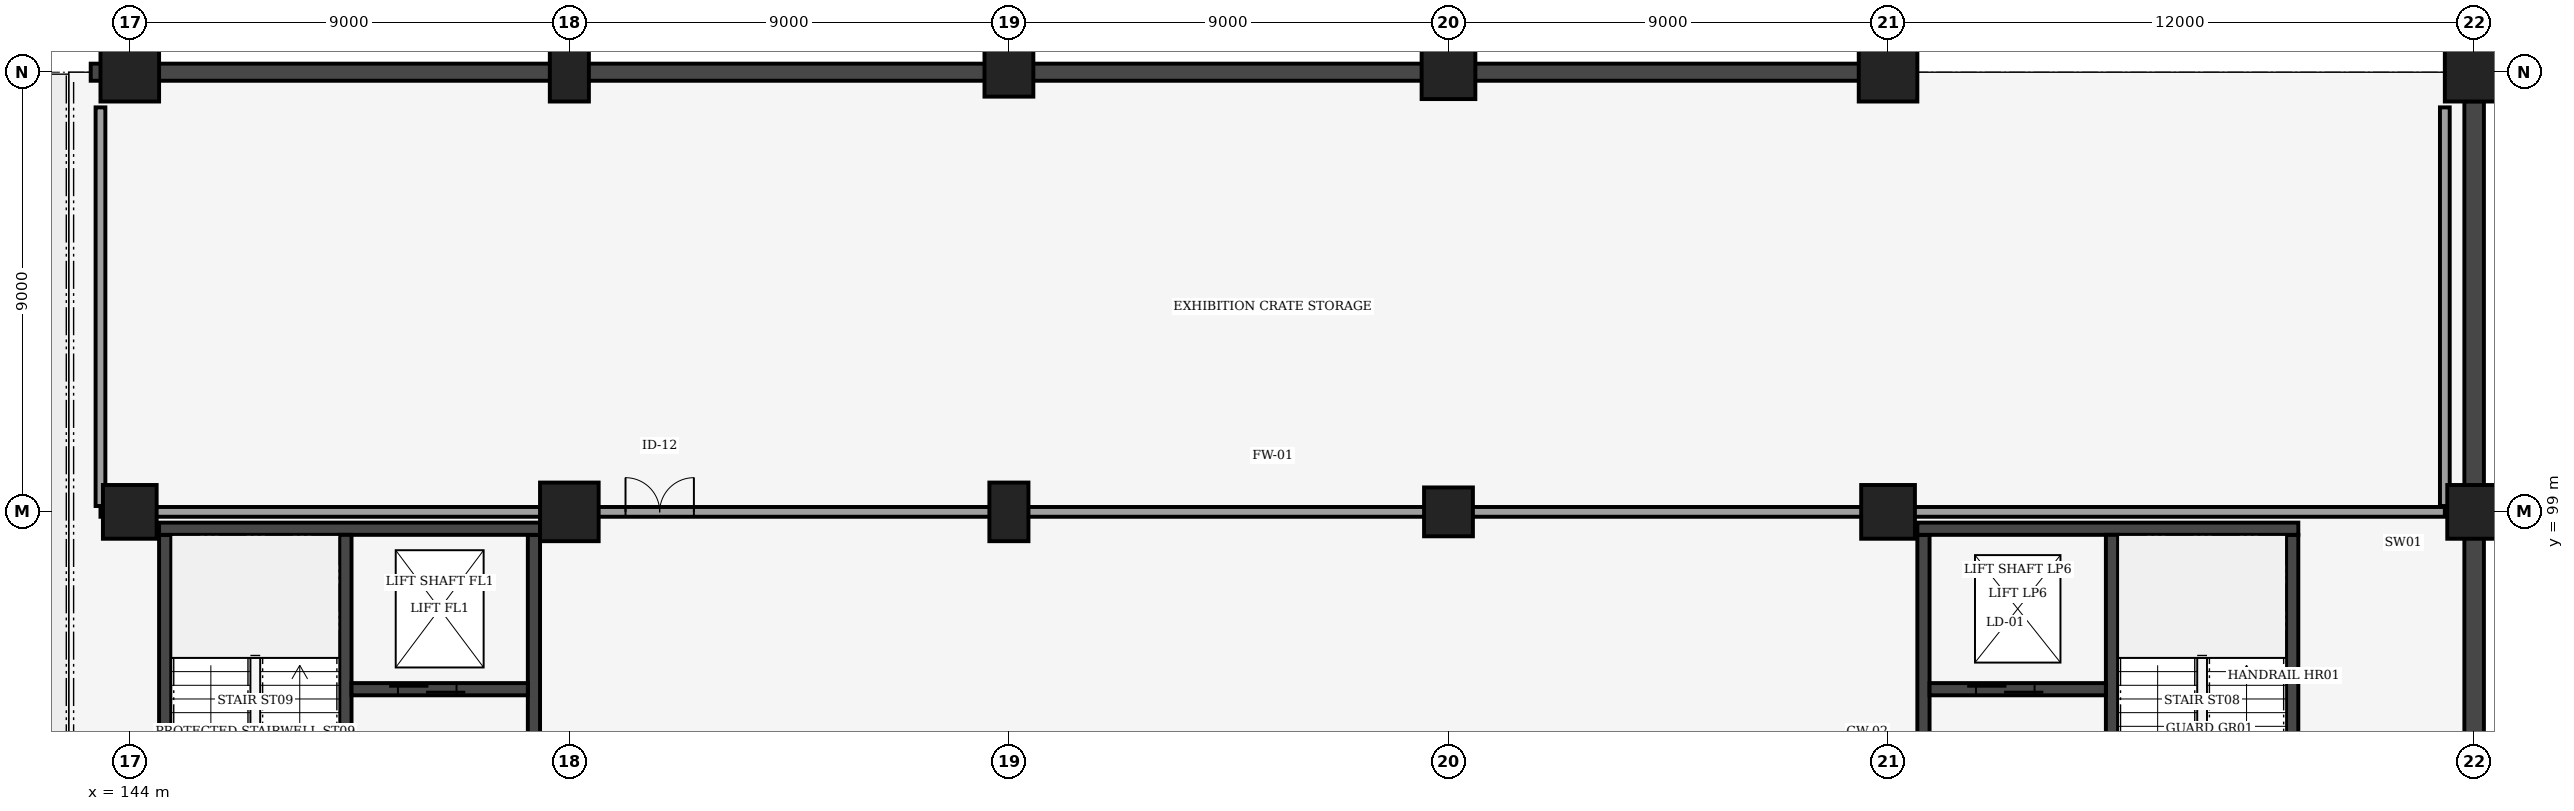
"""IFC4 building model, lengths in metres.
Left out: names, types, materials, properties, quantities, classifications, styles, units other than length and angle.
Written with IfcOpenShell. Run it as: python <this file> out.ifc"""

import sys

from ifc_helpers import new_model, si_unit, direction, frame, frame_2d, origin, origin_2d, place, context, subcontext, project, spatial, rectangle, extrude, element, fill, save


model = new_model("IFC4")
c1 = context("Model", 3, precision=1e-05, world=origin(), true_north=direction((0.0, 1.0)))
c2 = subcontext(c1, "Body", "Model", "MODEL_VIEW")
j1 = project(units=[si_unit("LENGTHUNIT", "METRE"), si_unit("PLANEANGLEUNIT", "RADIAN")], contexts=[c1])
p1 = place(None, origin())
s1 = spatial("IfcSite", under=j1, at=p1, CompositionType="ELEMENT")
p2 = place(p1, origin())
s2 = spatial("IfcBuilding", under=s1, at=p2, CompositionType="ELEMENT")
p3 = place(p2, frame((0.0, 0.0, -5.0)))
s3 = spatial("IfcBuildingStorey", under=s2, at=p3, CompositionType="ELEMENT", Elevation=-5.0)
p4 = place(p3, frame((144.0, 99.0, 0.0), z_axis=(0.0, 0.0, 1.0), x_axis=(1.0, 0.0, 0.0)))
e1 = element("IfcColumn", 1, at=p4, inside=s3, PredefinedType="COLUMN", context=c2, shape_type="SweptSolid", body=[
    extrude(rectangle(XDim=1.1, YDim=1.1, at=origin_2d()), origin(), (0.0, 0.0, 1.0), 5.0),
])
for number, where, z_axis, x_axis in (
    (2, (144.0, 108.0, 0.0), (0.0, 0.0, 1.0), (1.0, 0.0, 0.0)),
    (3, (153.0, 99.0, 0.0), (0.0, 0.0, 1.0), (1.0, 0.0, 0.0)),
):
    element("IfcColumn", number, at=place(p3, frame(where, z_axis=z_axis, x_axis=x_axis)), inside=s3, PredefinedType="COLUMN", context=c2, shape_type="SweptSolid", body=[
        extrude(rectangle(XDim=1.2, YDim=1.2, at=origin_2d()), origin(), (0.0, 0.0, 1.0), 5.0),
    ])
for number, where, z_axis, x_axis in (
    (4, (153.0, 108.0, 0.0), (0.0, 0.0, 1.0), (1.0, 0.0, 0.0)),
    (5, (162.0, 99.0, 0.0), (0.0, 0.0, 1.0), (1.0, 0.0, 0.0)),
):
    element("IfcColumn", number, at=place(p3, frame(where, z_axis=z_axis, x_axis=x_axis)), inside=s3, PredefinedType="COLUMN", context=c2, shape_type="SweptSolid", body=[
        extrude(rectangle(XDim=0.8, YDim=1.2, at=origin_2d()), origin(), (0.0, 0.0, 1.0), 5.0),
    ])
for number, where, z_axis, x_axis in (
    (6, (162.0, 108.0, 0.0), (0.0, 0.0, 1.0), (1.0, 0.0, 0.0)),
    (7, (171.0, 99.0, 0.0), (0.0, 0.0, 1.0), (1.0, 0.0, 0.0)),
):
    element("IfcColumn", number, at=place(p3, frame(where, z_axis=z_axis, x_axis=x_axis)), inside=s3, PredefinedType="COLUMN", context=c2, shape_type="SweptSolid", body=[
        extrude(rectangle(XDim=1.0, YDim=1.0, at=origin_2d()), origin(), (0.0, 0.0, 1.0), 5.0),
    ])
for number, where, z_axis, x_axis in (
    (8, (171.0, 108.0, 0.0), (0.0, 0.0, 1.0), (1.0, 0.0, 0.0)),
    (9, (180.0, 99.0, 0.0), (0.0, 0.0, 1.0), (1.0, 0.0, 0.0)),
):
    element("IfcColumn", number, at=place(p3, frame(where, z_axis=z_axis, x_axis=x_axis)), inside=s3, PredefinedType="COLUMN", context=c2, shape_type="SweptSolid", body=[
        extrude(rectangle(XDim=1.1, YDim=1.1, at=origin_2d()), origin(), (0.0, 0.0, 1.0), 5.0),
    ])
p5 = place(p3, frame((180.0, 108.0, 0.0), z_axis=(0.0, 0.0, 1.0), x_axis=(1.0, 0.0, 0.0)))
e10 = element("IfcColumn", 10, at=p5, inside=s3, PredefinedType="COLUMN", context=c2, shape_type="SweptSolid", body=[
    extrude(rectangle(XDim=1.2, YDim=1.2, at=origin_2d()), origin(), (0.0, 0.0, 1.0), 5.0),
])
p6 = place(p3, frame((192.0, 99.0, 0.0), z_axis=(0.0, 0.0, 1.0), x_axis=(1.0, 0.0, 0.0)))
e11 = element("IfcColumn", 11, at=p6, inside=s3, PredefinedType="COLUMN", context=c2, shape_type="SweptSolid", body=[
    extrude(rectangle(XDim=1.1, YDim=1.1, at=origin_2d()), origin(), (0.0, 0.0, 1.0), 5.0),
])
p7 = place(p3, frame((192.0, 108.0, 0.0), z_axis=(0.0, 0.0, 1.0), x_axis=(1.0, 0.0, 0.0)))
e12 = element("IfcColumn", 12, at=p7, inside=s3, PredefinedType="COLUMN", context=c2, shape_type="SweptSolid", body=[
    extrude(rectangle(XDim=1.2, YDim=1.2, at=origin_2d()), origin(), (0.0, 0.0, 1.0), 5.0),
])
p8 = place(p3, frame((192.0, 0.595, 0.0), z_axis=(0.0, 0.0, 1.0), x_axis=(0.0, 1.0, 0.0)))
e13 = element("IfcWall", 13, at=p8, inside=s3, PredefinedType="SHEAR", context=c2, shape_type="SweptSolid", body=[
    extrude(rectangle(XDim=106.81, YDim=0.4, at=frame_2d((53.405, 0.0))), origin(), (0.0, 0.0, 1.0), 3.95),
])
p9 = place(p3, frame((143.2, 108.0, 0.0), z_axis=(0.0, 0.0, 1.0), x_axis=(1.0, 0.0, 0.0)))
e14 = element("IfcWall", 14, at=p9, inside=s3, PredefinedType="SHEAR", context=c2, shape_type="SweptSolid", body=[
    extrude(rectangle(XDim=36.205, YDim=0.35, at=frame_2d((18.103, 0.0))), origin(), (0.0, 0.0, 1.0), 3.95),
])
p10 = place(p3, frame((180.725, 90.47, 0.0), z_axis=(0.0, 0.0, 1.0), x_axis=(0.0, 1.0, 0.0)))
e15 = element("IfcWall", 15, at=p10, inside=s3, PredefinedType="SHEAR", context=c2, shape_type="SweptSolid", body=[
    extrude(rectangle(XDim=8.06, YDim=0.25, at=frame_2d((4.03, 0.0))), origin(), (0.0, 0.0, 1.0), 4.64),
])
p11 = place(p10, frame((1.15, 0.0, 0.0)))
e16 = element("IfcOpeningElement", 16, at=p11, cuts=e15, PredefinedType="OPENING", context=c2, shape_type="SweptSolid", body=[
    extrude(rectangle(XDim=1.6, YDim=2.2, at=frame_2d((0.8, 1.1))), frame((0.0, 0.135, 0.0), z_axis=(0.0, -1.0, 0.0), x_axis=(1.0, 0.0, 0.0)), (0.0, 0.0, 1.0), 0.27),
])
p12 = place(p3, frame((188.275, 90.47, 0.0), z_axis=(0.0, 0.0, 1.0), x_axis=(0.0, 1.0, 0.0)))
e17 = element("IfcWall", 17, at=p12, inside=s3, PredefinedType="SHEAR", context=c2, shape_type="SweptSolid", body=[
    extrude(rectangle(XDim=8.06, YDim=0.25, at=frame_2d((4.03, 0.0))), origin(), (0.0, 0.0, 1.0), 4.64),
])
p13 = place(p3, frame((180.6, 98.655, 0.0), z_axis=(0.0, 0.0, 1.0), x_axis=(1.0, 0.0, 0.0)))
e18 = element("IfcWall", 18, at=p13, inside=s3, PredefinedType="SHEAR", context=c2, shape_type="SweptSolid", body=[
    extrude(rectangle(XDim=7.8, YDim=0.25, at=frame_2d((3.9, 0.0))), origin(), (0.0, 0.0, 1.0), 4.64),
])
p14 = place(p3, frame((184.585, 90.47, 0.0), z_axis=(0.0, 0.0, 1.0), x_axis=(0.0, 1.0, 0.0)))
e19 = element("IfcWall", 19, at=p14, inside=s3, PredefinedType="SHEAR", context=c2, shape_type="SweptSolid", body=[
    extrude(rectangle(XDim=8.06, YDim=0.25, at=frame_2d((4.03, 0.0))), origin(), (0.0, 0.0, 1.0), 4.64),
])
p15 = place(p14, frame((0.25, 0.0, 0.0)))
e20 = element("IfcOpeningElement", 20, at=p15, cuts=e19, PredefinedType="OPENING", context=c2, shape_type="SweptSolid", body=[
    extrude(rectangle(XDim=1.15, YDim=2.15, at=frame_2d((0.575, 1.075))), frame((0.0, 0.135, 0.0), z_axis=(0.0, -1.0, 0.0), x_axis=(1.0, 0.0, 0.0)), (0.0, 0.0, 1.0), 0.27),
])
p16 = place(p3, frame((180.85, 95.37, 0.0), z_axis=(0.0, 0.0, 1.0), x_axis=(1.0, 0.0, 0.0)))
e21 = element("IfcWall", 21, at=p16, inside=s3, PredefinedType="SHEAR", context=c2, shape_type="SweptSolid", body=[
    extrude(rectangle(XDim=3.61, YDim=0.25, at=frame_2d((1.805, 0.0))), origin(), (0.0, 0.0, 1.0), 4.64),
])
p17 = place(p16, frame((0.95, 0.0, 0.0)))
e22 = element("IfcOpeningElement", 22, at=p17, cuts=e21, PredefinedType="OPENING", context=c2, shape_type="SweptSolid", body=[
    extrude(rectangle(XDim=1.2, YDim=2.2, at=frame_2d((0.6, 1.1))), frame((0.0, 0.135, 0.0), z_axis=(0.0, -1.0, 0.0), x_axis=(1.0, 0.0, 0.0)), (0.0, 0.0, 1.0), 0.27),
])
p18 = place(p3, frame((144.725, 90.47, 0.0), z_axis=(0.0, 0.0, 1.0), x_axis=(0.0, 1.0, 0.0)))
e23 = element("IfcWall", 23, at=p18, inside=s3, PredefinedType="SHEAR", context=c2, shape_type="SweptSolid", body=[
    extrude(rectangle(XDim=8.06, YDim=0.25, at=frame_2d((4.03, 0.0))), origin(), (0.0, 0.0, 1.0), 4.64),
])
p19 = place(p3, frame((152.275, 90.47, 0.0), z_axis=(0.0, 0.0, 1.0), x_axis=(0.0, 1.0, 0.0)))
e24 = element("IfcWall", 24, at=p19, inside=s3, PredefinedType="SHEAR", context=c2, shape_type="SweptSolid", body=[
    extrude(rectangle(XDim=8.06, YDim=0.25, at=frame_2d((4.03, 0.0))), origin(), (0.0, 0.0, 1.0), 4.64),
])
p20 = place(p19, frame((1.15, 0.0, 0.0)))
e25 = element("IfcOpeningElement", 25, at=p20, cuts=e24, PredefinedType="OPENING", context=c2, shape_type="SweptSolid", body=[
    extrude(rectangle(XDim=1.8, YDim=2.2, at=frame_2d((0.9, 1.1))), frame((0.0, 0.135, 0.0), z_axis=(0.0, -1.0, 0.0), x_axis=(1.0, 0.0, 0.0)), (0.0, 0.0, 1.0), 0.27),
])
p21 = place(p3, frame((144.6, 98.655, 0.0), z_axis=(0.0, 0.0, 1.0), x_axis=(1.0, 0.0, 0.0)))
e26 = element("IfcWall", 26, at=p21, inside=s3, PredefinedType="SHEAR", context=c2, shape_type="SweptSolid", body=[
    extrude(rectangle(XDim=7.8, YDim=0.25, at=frame_2d((3.9, 0.0))), origin(), (0.0, 0.0, 1.0), 4.64),
])
p22 = place(p3, frame((148.415, 90.47, 0.0), z_axis=(0.0, 0.0, 1.0), x_axis=(0.0, 1.0, 0.0)))
e27 = element("IfcWall", 27, at=p22, inside=s3, PredefinedType="SHEAR", context=c2, shape_type="SweptSolid", body=[
    extrude(rectangle(XDim=8.06, YDim=0.25, at=frame_2d((4.03, 0.0))), origin(), (0.0, 0.0, 1.0), 4.64),
])
p23 = place(p22, frame((0.25, 0.0, 0.0)))
e28 = element("IfcOpeningElement", 28, at=p23, cuts=e27, PredefinedType="OPENING", context=c2, shape_type="SweptSolid", body=[
    extrude(rectangle(XDim=1.15, YDim=2.15, at=frame_2d((0.575, 1.075))), frame((0.0, 0.135, 0.0), z_axis=(0.0, -1.0, 0.0), x_axis=(1.0, 0.0, 0.0)), (0.0, 0.0, 1.0), 0.27),
])
p24 = place(p3, frame((148.54, 95.37, 0.0), z_axis=(0.0, 0.0, 1.0), x_axis=(1.0, 0.0, 0.0)))
e29 = element("IfcWall", 29, at=p24, inside=s3, PredefinedType="SHEAR", context=c2, shape_type="SweptSolid", body=[
    extrude(rectangle(XDim=3.61, YDim=0.25, at=frame_2d((1.805, 0.0))), origin(), (0.0, 0.0, 1.0), 4.64),
])
p25 = place(p24, frame((0.95, 0.0, 0.0)))
e30 = element("IfcOpeningElement", 30, at=p25, cuts=e29, PredefinedType="OPENING", context=c2, shape_type="SweptSolid", body=[
    extrude(rectangle(XDim=1.2, YDim=2.2, at=frame_2d((0.6, 1.1))), frame((0.0, 0.135, 0.0), z_axis=(0.0, -1.0, 0.0), x_axis=(1.0, 0.0, 0.0)), (0.0, 0.0, 1.0), 0.27),
])
p26 = place(p3, frame((143.4, 99.0, 0.0), z_axis=(0.0, 0.0, 1.0), x_axis=(1.0, 0.0, 0.0)))
e31 = element("IfcWall", 31, at=p26, inside=s3, PredefinedType="SOLIDWALL", context=c2, shape_type="SweptSolid", body=[
    extrude(rectangle(XDim=48.0, YDim=0.2, at=frame_2d((24.0, 0.0))), origin(), (0.0, 0.0, 1.0), 3.85),
])
p27 = place(p26, frame((10.75, 0.0, 0.0)))
e32 = element("IfcOpeningElement", 32, at=p27, cuts=e31, PredefinedType="OPENING", context=c2, shape_type="SweptSolid", body=[
    extrude(rectangle(XDim=1.4, YDim=2.25, at=frame_2d((0.7, 1.125))), frame((0.0, 0.11, 0.0), z_axis=(0.0, -1.0, 0.0), x_axis=(1.0, 0.0, 0.0)), (0.0, 0.0, 1.0), 0.22),
])
for number, where, z_axis, x_axis in (
    (33, (143.4, 99.12, 0.0), (0.0, 0.0, 1.0), (0.0, 1.0, 0.0)),
    (34, (191.4, 99.12, 0.0), (0.0, 0.0, 1.0), (0.0, 1.0, 0.0)),
):
    element("IfcWall", number, at=place(p3, frame(where, z_axis=z_axis, x_axis=x_axis)), inside=s3, PredefinedType="SOLIDWALL", context=c2, shape_type="SweptSolid", body=[
        extrude(rectangle(XDim=8.16, YDim=0.2, at=frame_2d((4.08, 0.0))), origin(), (0.0, 0.0, 1.0), 3.85),
    ])
p28 = place(p17, origin())
e35 = element("IfcDoor", 35, at=p28, inside=s3, OperationType="DOUBLE_DOOR_SLIDING", PredefinedType="DOOR", context=c2, shape_type="SweptSolid", body=[
    extrude(rectangle(XDim=1.2, YDim=2.2, at=frame_2d((0.6, 1.1))), frame((0.0, 0.025, 0.0), z_axis=(0.0, -1.0, 0.0), x_axis=(1.0, 0.0, 0.0)), (0.0, 0.0, 1.0), 0.05),
])
fill(e22, e35)
p29 = place(p25, origin())
e36 = element("IfcDoor", 36, at=p29, inside=s3, OperationType="DOUBLE_DOOR_SLIDING", PredefinedType="DOOR", context=c2, shape_type="SweptSolid", body=[
    extrude(rectangle(XDim=1.2, YDim=2.2, at=frame_2d((0.6, 1.1))), frame((0.0, 0.025, 0.0), z_axis=(0.0, -1.0, 0.0), x_axis=(1.0, 0.0, 0.0)), (0.0, 0.0, 1.0), 0.05),
])
fill(e30, e36)
p30 = place(p27, origin())
e37 = element("IfcDoor", 37, at=p30, inside=s3, OperationType="DOUBLE_DOOR_SINGLE_SWING", PredefinedType="DOOR", context=c2, shape_type="SweptSolid", body=[
    extrude(rectangle(XDim=1.4, YDim=2.25, at=frame_2d((0.7, 1.125))), frame((0.0, 0.025, 0.0), z_axis=(0.0, -1.0, 0.0), x_axis=(1.0, 0.0, 0.0)), (0.0, 0.0, 1.0), 0.05),
])
fill(e32, e37)
save(model, sys.argv[1])
